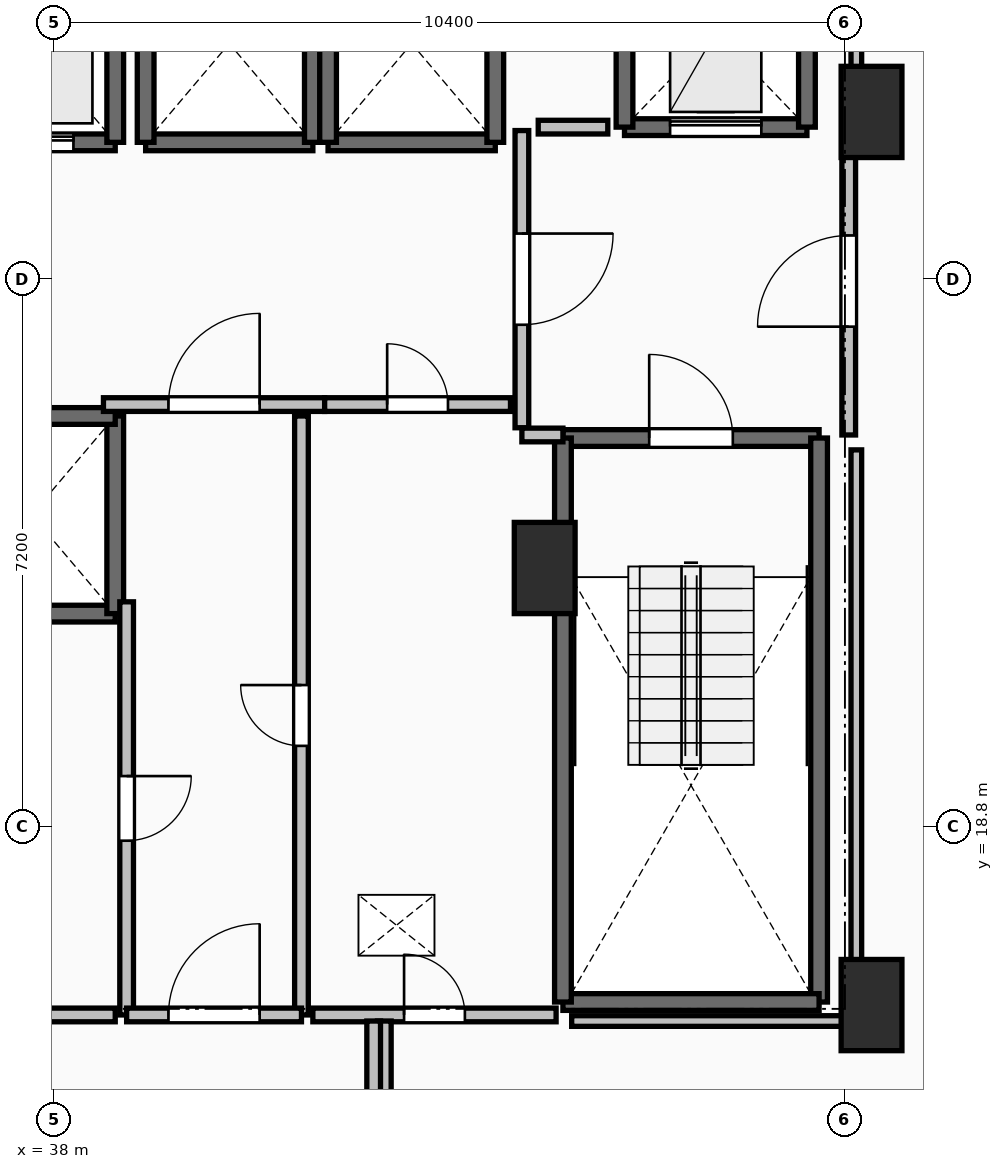
"""IFC4 building model, lengths in metres.
Left out: names, types, materials, properties, quantities, classifications, styles, units other than length and angle.
Written with IfcOpenShell. Run it as: python <this file> out.ifc"""

import sys

from ifc_helpers import new_model, si_unit, direction, frame, frame_2d, origin, origin_2d, place, context, subcontext, project, spatial, rectangle, extrude, element, fill, save


model = new_model("IFC4")
c1 = context("Model", 3, precision=1e-05, world=origin(), true_north=direction((0.0, 1.0)))
c2 = subcontext(c1, "Body", "Model", "MODEL_VIEW")
j1 = project(units=[si_unit("LENGTHUNIT", "METRE"), si_unit("PLANEANGLEUNIT", "RADIAN")], contexts=[c1])
p1 = place(None, origin())
s1 = spatial("IfcSite", under=j1, at=p1, CompositionType="ELEMENT")
p2 = place(p1, origin())
s2 = spatial("IfcBuilding", under=s1, at=p2, CompositionType="ELEMENT")
p3 = place(p2, frame((0.0, 0.0, 85.8)))
s3 = spatial("IfcBuildingStorey", under=s2, at=p3, CompositionType="ELEMENT", Elevation=85.8)
for number, where, z_axis, x_axis in (
    (1, (48.75, 28.2, 0.0), (0.0, 0.0, 1.0), (1.0, 0.0, 0.0)),
    (2, (48.75, 16.45, 0.0), (0.0, 0.0, 1.0), (1.0, 0.0, 0.0)),
    (3, (44.45, 22.2, 0.0), (0.0, 0.0, 1.0), (1.0, 0.0, 0.0)),
):
    element("IfcColumn", number, at=place(p3, frame(where, z_axis=z_axis, x_axis=x_axis)), inside=s3, PredefinedType="PILASTER", context=c2, shape_type="SweptSolid", body=[
        extrude(rectangle(XDim=0.8, YDim=1.2, at=origin_2d()), origin(), (0.0, 0.0, 1.0), 3.5),
    ])
p4 = place(p3, frame((44.69, 23.91, 0.0), z_axis=(0.0, 0.0, 1.0), x_axis=(1.0, 0.0, 0.0)))
e4 = element("IfcWall", 4, at=p4, inside=s3, PredefinedType="SOLIDWALL", context=c2, shape_type="SweptSolid", body=[
    extrude(rectangle(XDim=3.37, YDim=0.22, at=frame_2d((1.685, 0.0))), origin(), (0.0, 0.0, 1.0), 3.24),
])
p5 = place(p4, frame((1.135, 0.0, 0.0)))
e5 = element("IfcOpeningElement", 5, at=p5, cuts=e4, PredefinedType="OPENING", context=c2, shape_type="SweptSolid", body=[
    extrude(rectangle(XDim=1.1, YDim=2.15, at=frame_2d((0.55, 1.075))), frame((0.0, 0.125, 0.0), z_axis=(0.0, -1.0, 0.0), x_axis=(1.0, 0.0, 0.0)), (0.0, 0.0, 1.0), 0.25),
])
p6 = place(p3, frame((48.06, 23.91, 0.0), z_axis=(0.0, 0.0, 1.0), x_axis=(0.0, -1.0, 0.0)))
e6 = element("IfcWall", 6, at=p6, inside=s3, PredefinedType="SOLIDWALL", context=c2, shape_type="SweptSolid", body=[
    extrude(rectangle(XDim=7.42, YDim=0.22, at=frame_2d((3.71, 0.0))), origin(), (0.0, 0.0, 1.0), 3.24),
])
p7 = place(p3, frame((48.06, 16.49, 0.0), z_axis=(0.0, 0.0, 1.0), x_axis=(-1.0, 0.0, 0.0)))
e7 = element("IfcWall", 7, at=p7, inside=s3, PredefinedType="SOLIDWALL", context=c2, shape_type="SweptSolid", body=[
    extrude(rectangle(XDim=3.37, YDim=0.22, at=frame_2d((1.685, 0.0))), origin(), (0.0, 0.0, 1.0), 3.24),
])
p8 = place(p3, frame((44.69, 16.49, 0.0), z_axis=(0.0, 0.0, 1.0), x_axis=(0.0, 1.0, 0.0)))
e8 = element("IfcWall", 8, at=p8, inside=s3, PredefinedType="SOLIDWALL", context=c2, shape_type="SweptSolid", body=[
    extrude(rectangle(XDim=7.42, YDim=0.22, at=frame_2d((3.71, 0.0))), origin(), (0.0, 0.0, 1.0), 3.24),
])
p9 = place(p3, frame((36.6, 27.8, 0.0), z_axis=(0.0, 0.0, 1.0), x_axis=(1.0, 0.0, 0.0)))
e9 = element("IfcWall", 9, at=p9, inside=s3, PredefinedType="SOLIDWALL", context=c2, shape_type="SweptSolid", body=[
    extrude(rectangle(XDim=2.2, YDim=0.22, at=frame_2d((1.1, 0.0))), origin(), (0.0, 0.0, 1.0), 3.24),
])
p10 = place(p9, frame((0.55, 0.0, 0.0)))
e10 = element("IfcOpeningElement", 10, at=p10, cuts=e9, PredefinedType="OPENING", context=c2, shape_type="SweptSolid", body=[
    extrude(rectangle(XDim=1.1, YDim=2.2, at=frame_2d((0.55, 1.1))), frame((0.0, 0.125, 0.0), z_axis=(0.0, -1.0, 0.0), x_axis=(1.0, 0.0, 0.0)), (0.0, 0.0, 1.0), 0.25),
])
p11 = place(p3, frame((38.8, 27.8, 0.0), z_axis=(0.0, 0.0, 1.0), x_axis=(0.0, 1.0, 0.0)))
e11 = element("IfcWall", 11, at=p11, inside=s3, PredefinedType="SOLIDWALL", context=c2, shape_type="SweptSolid", body=[
    extrude(rectangle(XDim=2.6, YDim=0.22, at=frame_2d((1.3, 0.0))), origin(), (0.0, 0.0, 1.0), 3.24),
])
p12 = place(p3, frame((36.6, 21.6, 0.0), z_axis=(0.0, 0.0, 1.0), x_axis=(1.0, 0.0, 0.0)))
e12 = element("IfcWall", 12, at=p12, inside=s3, PredefinedType="SOLIDWALL", context=c2, shape_type="SweptSolid", body=[
    extrude(rectangle(XDim=2.2, YDim=0.22, at=frame_2d((1.1, 0.0))), origin(), (0.0, 0.0, 1.0), 3.24),
])
p13 = place(p3, frame((38.8, 21.6, 0.0), z_axis=(0.0, 0.0, 1.0), x_axis=(0.0, 1.0, 0.0)))
e13 = element("IfcWall", 13, at=p13, inside=s3, PredefinedType="SOLIDWALL", context=c2, shape_type="SweptSolid", body=[
    extrude(rectangle(XDim=2.6, YDim=0.22, at=frame_2d((1.3, 0.0))), origin(), (0.0, 0.0, 1.0), 3.24),
])
for number, where, z_axis, x_axis in (
    (14, (38.8, 24.2, 0.0), (0.0, 0.0, 1.0), (-1.0, 0.0, 0.0)),
    (15, (39.2, 27.8, 0.0), (0.0, 0.0, 1.0), (1.0, 0.0, 0.0)),
):
    element("IfcWall", number, at=place(p3, frame(where, z_axis=z_axis, x_axis=x_axis)), inside=s3, PredefinedType="SOLIDWALL", context=c2, shape_type="SweptSolid", body=[
        extrude(rectangle(XDim=2.2, YDim=0.22, at=frame_2d((1.1, 0.0))), origin(), (0.0, 0.0, 1.0), 3.24),
    ])
for number, where, z_axis, x_axis in (
    (16, (41.4, 27.8, 0.0), (0.0, 0.0, 1.0), (0.0, 1.0, 0.0)),
    (17, (39.2, 30.4, 0.0), (0.0, 0.0, 1.0), (0.0, -1.0, 0.0)),
):
    element("IfcWall", number, at=place(p3, frame(where, z_axis=z_axis, x_axis=x_axis)), inside=s3, PredefinedType="SOLIDWALL", context=c2, shape_type="SweptSolid", body=[
        extrude(rectangle(XDim=2.6, YDim=0.22, at=frame_2d((1.3, 0.0))), origin(), (0.0, 0.0, 1.0), 3.24),
    ])
p14 = place(p3, frame((41.6, 27.8, 0.0), z_axis=(0.0, 0.0, 1.0), x_axis=(1.0, 0.0, 0.0)))
e18 = element("IfcWall", 18, at=p14, inside=s3, PredefinedType="SOLIDWALL", context=c2, shape_type="SweptSolid", body=[
    extrude(rectangle(XDim=2.2, YDim=0.22, at=frame_2d((1.1, 0.0))), origin(), (0.0, 0.0, 1.0), 3.24),
])
for number, where, z_axis, x_axis in (
    (19, (43.8, 27.8, 0.0), (0.0, 0.0, 1.0), (0.0, 1.0, 0.0)),
    (20, (41.6, 30.4, 0.0), (0.0, 0.0, 1.0), (0.0, -1.0, 0.0)),
):
    element("IfcWall", number, at=place(p3, frame(where, z_axis=z_axis, x_axis=x_axis)), inside=s3, PredefinedType="SOLIDWALL", context=c2, shape_type="SweptSolid", body=[
        extrude(rectangle(XDim=2.6, YDim=0.22, at=frame_2d((1.3, 0.0))), origin(), (0.0, 0.0, 1.0), 3.24),
    ])
p15 = place(p3, frame((45.5, 28.0, 0.0), z_axis=(0.0, 0.0, 1.0), x_axis=(1.0, 0.0, 0.0)))
e21 = element("IfcWall", 21, at=p15, inside=s3, PredefinedType="SHEAR", context=c2, shape_type="SweptSolid", body=[
    extrude(rectangle(XDim=2.4, YDim=0.22, at=frame_2d((1.2, 0.0))), origin(), (0.0, 0.0, 1.0), 3.24),
])
p16 = place(p15, frame((0.6, 0.0, 0.0)))
e22 = element("IfcOpeningElement", 22, at=p16, cuts=e21, PredefinedType="OPENING", context=c2, shape_type="SweptSolid", body=[
    extrude(rectangle(XDim=1.2, YDim=2.2, at=frame_2d((0.6, 1.1))), frame((0.0, 0.125, 0.0), z_axis=(0.0, -1.0, 0.0), x_axis=(1.0, 0.0, 0.0)), (0.0, 0.0, 1.0), 0.25),
])
for number, where, z_axis, x_axis in (
    (23, (47.9, 28.0, 0.0), (0.0, 0.0, 1.0), (0.0, 1.0, 0.0)),
    (24, (45.5, 30.5, 0.0), (0.0, 0.0, 1.0), (0.0, -1.0, 0.0)),
):
    element("IfcWall", number, at=place(p3, frame(where, z_axis=z_axis, x_axis=x_axis)), inside=s3, PredefinedType="SHEAR", context=c2, shape_type="SweptSolid", body=[
        extrude(rectangle(XDim=2.5, YDim=0.22, at=frame_2d((1.25, 0.0))), origin(), (0.0, 0.0, 1.0), 3.24),
    ])
p17 = place(p3, frame((44.15, 27.955, 0.0), z_axis=(0.0, 0.0, 1.0), x_axis=(0.0, -1.0, 0.0)))
e25 = element("IfcWall", 25, at=p17, inside=s3, PredefinedType="PARTITIONING", context=c2, shape_type="SweptSolid", body=[
    extrude(rectangle(XDim=3.91, YDim=0.18, at=frame_2d((1.955, 0.0))), origin(), (0.0, 0.0, 1.0), 3.24),
])
p18 = place(p17, frame((1.355, 0.0, 0.0)))
e26 = element("IfcOpeningElement", 26, at=p18, cuts=e25, PredefinedType="OPENING", context=c2, shape_type="SweptSolid", body=[
    extrude(rectangle(XDim=1.2, YDim=2.15, at=frame_2d((0.6, 1.075))), frame((0.0, 0.105, 0.0), z_axis=(0.0, -1.0, 0.0), x_axis=(1.0, 0.0, 0.0)), (0.0, 0.0, 1.0), 0.21),
])
p19 = place(p3, frame((44.15, 23.95, 0.0), z_axis=(0.0, 0.0, 1.0), x_axis=(1.0, 0.0, 0.0)))
e27 = element("IfcWall", 27, at=p19, inside=s3, PredefinedType="PARTITIONING", context=c2, shape_type="SweptSolid", body=[
    extrude(rectangle(XDim=0.54, YDim=0.18, at=frame_2d((0.27, 0.0))), origin(), (0.0, 0.0, 1.0), 3.24),
])
p20 = place(p3, frame((48.45, 23.95, 0.0), z_axis=(0.0, 0.0, 1.0), x_axis=(0.0, 1.0, 0.0)))
e28 = element("IfcWall", 28, at=p20, inside=s3, PredefinedType="PARTITIONING", context=c2, shape_type="SweptSolid", body=[
    extrude(rectangle(XDim=4.05, YDim=0.18, at=frame_2d((2.025, 0.0))), origin(), (0.0, 0.0, 1.0), 3.24),
])
p21 = place(p20, frame((1.425, 0.0, 0.0)))
e29 = element("IfcOpeningElement", 29, at=p21, cuts=e28, PredefinedType="OPENING", context=c2, shape_type="SweptSolid", body=[
    extrude(rectangle(XDim=1.2, YDim=2.15, at=frame_2d((0.6, 1.075))), frame((0.0, 0.105, 0.0), z_axis=(0.0, -1.0, 0.0), x_axis=(1.0, 0.0, 0.0)), (0.0, 0.0, 1.0), 0.21),
])
p22 = place(p3, frame((38.645, 24.35, 0.0), z_axis=(0.0, 0.0, 1.0), x_axis=(1.0, 0.0, 0.0)))
e30 = element("IfcWall", 30, at=p22, inside=s3, PredefinedType="PARTITIONING", context=c2, shape_type="SweptSolid", body=[
    extrude(rectangle(XDim=2.91, YDim=0.18, at=frame_2d((1.455, 0.0))), origin(), (0.0, 0.0, 1.0), 3.24),
])
p23 = place(p22, frame((0.855, 0.0, 0.0)))
e31 = element("IfcOpeningElement", 31, at=p23, cuts=e30, PredefinedType="OPENING", context=c2, shape_type="SweptSolid", body=[
    extrude(rectangle(XDim=1.2, YDim=2.15, at=frame_2d((0.6, 1.075))), frame((0.0, 0.105, 0.0), z_axis=(0.0, -1.0, 0.0), x_axis=(1.0, 0.0, 0.0)), (0.0, 0.0, 1.0), 0.21),
])
p24 = place(p3, frame((41.555, 24.35, 0.0), z_axis=(0.0, 0.0, 1.0), x_axis=(1.0, 0.0, 0.0)))
e32 = element("IfcWall", 32, at=p24, inside=s3, PredefinedType="PARTITIONING", context=c2, shape_type="SweptSolid", body=[
    extrude(rectangle(XDim=2.445, YDim=0.18, at=frame_2d((1.223, 0.0))), origin(), (0.0, 0.0, 1.0), 3.24),
])
p25 = place(p24, frame((0.823, 0.0, 0.0)))
e33 = element("IfcOpeningElement", 33, at=p25, cuts=e32, PredefinedType="OPENING", context=c2, shape_type="SweptSolid", body=[
    extrude(rectangle(XDim=0.8, YDim=2.05, at=frame_2d((0.4, 1.025))), frame((0.0, 0.105, 0.0), z_axis=(0.0, -1.0, 0.0), x_axis=(1.0, 0.0, 0.0)), (0.0, 0.0, 1.0), 0.21),
])
p26 = place(p3, frame((41.25, 16.32, 0.0), z_axis=(0.0, 0.0, 1.0), x_axis=(0.0, 1.0, 0.0)))
e34 = element("IfcWall", 34, at=p26, inside=s3, PredefinedType="PARTITIONING", context=c2, shape_type="SweptSolid", body=[
    extrude(rectangle(XDim=7.88, YDim=0.18, at=frame_2d((3.94, 0.0))), origin(), (0.0, 0.0, 1.0), 3.24),
])
p27 = place(p26, frame((3.54, 0.0, 0.0)))
e35 = element("IfcOpeningElement", 35, at=p27, cuts=e34, PredefinedType="OPENING", context=c2, shape_type="SweptSolid", body=[
    extrude(rectangle(XDim=0.8, YDim=2.05, at=frame_2d((0.4, 1.025))), frame((0.0, 0.105, 0.0), z_axis=(0.0, -1.0, 0.0), x_axis=(1.0, 0.0, 0.0)), (0.0, 0.0, 1.0), 0.21),
])
p28 = place(p3, frame((38.95, 21.755, 0.0), z_axis=(0.0, 0.0, 1.0), x_axis=(0.0, -1.0, 0.0)))
e36 = element("IfcWall", 36, at=p28, inside=s3, PredefinedType="PARTITIONING", context=c2, shape_type="SweptSolid", body=[
    extrude(rectangle(XDim=5.435, YDim=0.18, at=frame_2d((2.717, 0.0))), origin(), (0.0, 0.0, 1.0), 3.24),
])
p29 = place(p28, frame((2.292, 0.0, 0.0)))
e37 = element("IfcOpeningElement", 37, at=p29, cuts=e36, PredefinedType="OPENING", context=c2, shape_type="SweptSolid", body=[
    extrude(rectangle(XDim=0.85, YDim=2.1, at=frame_2d((0.425, 1.05))), frame((0.0, 0.105, 0.0), z_axis=(0.0, -1.0, 0.0), x_axis=(1.0, 0.0, 0.0)), (0.0, 0.0, 1.0), 0.21),
])
p30 = place(p3, frame((38.95, 16.32, 0.0), z_axis=(0.0, 0.0, 1.0), x_axis=(1.0, 0.0, 0.0)))
e38 = element("IfcWall", 38, at=p30, inside=s3, PredefinedType="PARTITIONING", context=c2, shape_type="SweptSolid", body=[
    extrude(rectangle(XDim=2.3, YDim=0.18, at=frame_2d((1.15, 0.0))), origin(), (0.0, 0.0, 1.0), 3.24),
])
p31 = place(p30, frame((0.55, 0.0, 0.0)))
e39 = element("IfcOpeningElement", 39, at=p31, cuts=e38, PredefinedType="OPENING", context=c2, shape_type="SweptSolid", body=[
    extrude(rectangle(XDim=1.2, YDim=2.15, at=frame_2d((0.6, 1.075))), frame((0.0, 0.105, 0.0), z_axis=(0.0, -1.0, 0.0), x_axis=(1.0, 0.0, 0.0)), (0.0, 0.0, 1.0), 0.21),
])
p32 = place(p3, frame((41.4, 16.32, 0.0), z_axis=(0.0, 0.0, 1.0), x_axis=(1.0, 0.0, 0.0)))
e40 = element("IfcWall", 40, at=p32, inside=s3, PredefinedType="PARTITIONING", context=c2, shape_type="SweptSolid", body=[
    extrude(rectangle(XDim=3.2, YDim=0.18, at=frame_2d((1.6, 0.0))), origin(), (0.0, 0.0, 1.0), 3.24),
])
p33 = place(p32, frame((1.2, 0.0, 0.0)))
e41 = element("IfcOpeningElement", 41, at=p33, cuts=e40, PredefinedType="OPENING", context=c2, shape_type="SweptSolid", body=[
    extrude(rectangle(XDim=0.8, YDim=2.05, at=frame_2d((0.4, 1.025))), frame((0.0, 0.105, 0.0), z_axis=(0.0, -1.0, 0.0), x_axis=(1.0, 0.0, 0.0)), (0.0, 0.0, 1.0), 0.21),
])
p34 = place(p3, frame((35.2, 16.32, 0.0), z_axis=(0.0, 0.0, 1.0), x_axis=(1.0, 0.0, 0.0)))
e42 = element("IfcWall", 42, at=p34, inside=s3, PredefinedType="PARTITIONING", context=c2, shape_type="SweptSolid", body=[
    extrude(rectangle(XDim=3.6, YDim=0.18, at=frame_2d((1.8, 0.0))), origin(), (0.0, 0.0, 1.0), 3.24),
])
p35 = place(p34, frame((1.375, 0.0, 0.0)))
e43 = element("IfcOpeningElement", 43, at=p35, cuts=e42, PredefinedType="OPENING", context=c2, shape_type="SweptSolid", body=[
    extrude(rectangle(XDim=0.85, YDim=2.1, at=frame_2d((0.425, 1.05))), frame((0.0, 0.105, 0.0), z_axis=(0.0, -1.0, 0.0), x_axis=(1.0, 0.0, 0.0)), (0.0, 0.0, 1.0), 0.21),
])
for number, where, z_axis, x_axis in (
    (44, (42.34, 16.24, 0.0), (0.0, 0.0, 1.0), (0.0, -1.0, 0.0)),
    (45, (42.2, 14.1, 0.0), (0.0, 0.0, 1.0), (0.0, 1.0, 0.0)),
):
    element("IfcWall", number, at=place(p3, frame(where, z_axis=z_axis, x_axis=x_axis)), inside=s3, PredefinedType="PARTITIONING", context=c2, shape_type="SweptSolid", body=[
        extrude(rectangle(XDim=2.14, YDim=0.18, at=frame_2d((1.07, 0.0))), origin(), (0.0, 0.0, 1.0), 2.922),
    ])
p36 = place(p3, frame((45.28, 28.0, 0.0), z_axis=(0.0, 0.0, 1.0), x_axis=(-1.0, 0.0, 0.0)))
e46 = element("IfcWall", 46, at=p36, inside=s3, PredefinedType="PARTITIONING", context=c2, shape_type="SweptSolid", body=[
    extrude(rectangle(XDim=0.915, YDim=0.18, at=frame_2d((0.458, 0.0))), origin(), (0.0, 0.0, 1.0), 3.24),
])
p37 = place(p3, frame((48.55, 33.45, 0.0), z_axis=(0.0, 0.0, 1.0), x_axis=(0.0, -1.0, 0.0)))
e47 = element("IfcWall", 47, at=p37, inside=s3, PredefinedType="PARTITIONING", context=c2, shape_type="SweptSolid", body=[
    extrude(rectangle(XDim=5.254, YDim=0.14, at=frame_2d((2.627, 0.0))), origin(), (0.0, 0.0, 1.0), 2.432),
])
p38 = place(p3, frame((48.55, 23.754, 0.0), z_axis=(0.0, 0.0, 1.0), x_axis=(0.0, -1.0, 0.0)))
e48 = element("IfcWall", 48, at=p38, inside=s3, PredefinedType="PARTITIONING", context=c2, shape_type="SweptSolid", body=[
    extrude(rectangle(XDim=7.514, YDim=0.14, at=frame_2d((3.757, 0.0))), origin(), (0.0, 0.0, 1.0), 2.432),
])
p39 = place(p3, frame((48.55, 16.24, 0.0), z_axis=(0.0, 0.0, 1.0), x_axis=(-1.0, 0.0, 0.0)))
e49 = element("IfcWall", 49, at=p39, inside=s3, PredefinedType="PARTITIONING", context=c2, shape_type="SweptSolid", body=[
    extrude(rectangle(XDim=3.745, YDim=0.14, at=frame_2d((1.873, 0.0))), origin(), (0.0, 0.0, 1.0), 2.432),
])
p40 = place(p5, origin())
e50 = element("IfcDoor", 50, at=p40, inside=s3, OperationType="SINGLE_SWING_LEFT", PredefinedType="DOOR", context=c2, shape_type="SweptSolid", body=[
    extrude(rectangle(XDim=1.1, YDim=2.15, at=frame_2d((0.55, 1.075))), frame((0.0, 0.025, 0.0), z_axis=(0.0, -1.0, 0.0), x_axis=(1.0, 0.0, 0.0)), (0.0, 0.0, 1.0), 0.05),
])
fill(e5, e50)
p41 = place(p10, origin())
e51 = element("IfcDoor", 51, at=p41, inside=s3, OperationType="SLIDING_TO_LEFT", PredefinedType="DOOR", context=c2, shape_type="SweptSolid", body=[
    extrude(rectangle(XDim=1.1, YDim=2.2, at=frame_2d((0.55, 1.1))), frame((0.0, 0.025, 0.0), z_axis=(0.0, -1.0, 0.0), x_axis=(1.0, 0.0, 0.0)), (0.0, 0.0, 1.0), 0.05),
])
fill(e10, e51)
p42 = place(p16, origin())
e52 = element("IfcDoor", 52, at=p42, inside=s3, OperationType="SLIDING_TO_LEFT", PredefinedType="DOOR", context=c2, shape_type="SweptSolid", body=[
    extrude(rectangle(XDim=1.2, YDim=2.2, at=frame_2d((0.6, 1.1))), frame((0.0, 0.025, 0.0), z_axis=(0.0, -1.0, 0.0), x_axis=(1.0, 0.0, 0.0)), (0.0, 0.0, 1.0), 0.05),
])
fill(e22, e52)
p43 = place(p18, origin())
e53 = element("IfcDoor", 53, at=p43, inside=s3, OperationType="SINGLE_SWING_LEFT", PredefinedType="DOOR", context=c2, shape_type="SweptSolid", body=[
    extrude(rectangle(XDim=1.2, YDim=2.15, at=frame_2d((0.6, 1.075))), frame((0.0, 0.025, 0.0), z_axis=(0.0, -1.0, 0.0), x_axis=(1.0, 0.0, 0.0)), (0.0, 0.0, 1.0), 0.05),
])
fill(e26, e53)
p44 = place(p21, origin())
e54 = element("IfcDoor", 54, at=p44, inside=s3, OperationType="SINGLE_SWING_LEFT", PredefinedType="DOOR", context=c2, shape_type="SweptSolid", body=[
    extrude(rectangle(XDim=1.2, YDim=2.15, at=frame_2d((0.6, 1.075))), frame((0.0, 0.025, 0.0), z_axis=(0.0, -1.0, 0.0), x_axis=(1.0, 0.0, 0.0)), (0.0, 0.0, 1.0), 0.05),
])
fill(e29, e54)
p45 = place(p23, origin())
e55 = element("IfcDoor", 55, at=p45, inside=s3, OperationType="SINGLE_SWING_RIGHT", PredefinedType="DOOR", context=c2, shape_type="SweptSolid", body=[
    extrude(rectangle(XDim=1.2, YDim=2.15, at=frame_2d((0.6, 1.075))), frame((0.0, 0.025, 0.0), z_axis=(0.0, -1.0, 0.0), x_axis=(1.0, 0.0, 0.0)), (0.0, 0.0, 1.0), 0.05),
])
fill(e31, e55)
p46 = place(p25, origin())
e56 = element("IfcDoor", 56, at=p46, inside=s3, OperationType="SINGLE_SWING_LEFT", PredefinedType="DOOR", context=c2, shape_type="SweptSolid", body=[
    extrude(rectangle(XDim=0.8, YDim=2.05, at=frame_2d((0.4, 1.025))), frame((0.0, 0.025, 0.0), z_axis=(0.0, -1.0, 0.0), x_axis=(1.0, 0.0, 0.0)), (0.0, 0.0, 1.0), 0.05),
])
fill(e33, e56)
p47 = place(p27, origin())
e57 = element("IfcDoor", 57, at=p47, inside=s3, OperationType="SINGLE_SWING_RIGHT", PredefinedType="DOOR", context=c2, shape_type="SweptSolid", body=[
    extrude(rectangle(XDim=0.8, YDim=2.05, at=frame_2d((0.4, 1.025))), frame((0.0, 0.025, 0.0), z_axis=(0.0, -1.0, 0.0), x_axis=(1.0, 0.0, 0.0)), (0.0, 0.0, 1.0), 0.05),
])
fill(e35, e57)
p48 = place(p29, origin())
e58 = element("IfcDoor", 58, at=p48, inside=s3, OperationType="SINGLE_SWING_LEFT", PredefinedType="DOOR", context=c2, shape_type="SweptSolid", body=[
    extrude(rectangle(XDim=0.85, YDim=2.1, at=frame_2d((0.425, 1.05))), frame((0.0, 0.025, 0.0), z_axis=(0.0, -1.0, 0.0), x_axis=(1.0, 0.0, 0.0)), (0.0, 0.0, 1.0), 0.05),
])
fill(e37, e58)
p49 = place(p31, origin())
e59 = element("IfcDoor", 59, at=p49, inside=s3, OperationType="SINGLE_SWING_RIGHT", PredefinedType="DOOR", context=c2, shape_type="SweptSolid", body=[
    extrude(rectangle(XDim=1.2, YDim=2.15, at=frame_2d((0.6, 1.075))), frame((0.0, 0.025, 0.0), z_axis=(0.0, -1.0, 0.0), x_axis=(1.0, 0.0, 0.0)), (0.0, 0.0, 1.0), 0.05),
])
fill(e39, e59)
p50 = place(p33, origin())
e60 = element("IfcDoor", 60, at=p50, inside=s3, OperationType="SINGLE_SWING_LEFT", PredefinedType="DOOR", context=c2, shape_type="SweptSolid", body=[
    extrude(rectangle(XDim=0.8, YDim=2.05, at=frame_2d((0.4, 1.025))), frame((0.0, 0.025, 0.0), z_axis=(0.0, -1.0, 0.0), x_axis=(1.0, 0.0, 0.0)), (0.0, 0.0, 1.0), 0.05),
])
fill(e41, e60)
save(model, sys.argv[1])
